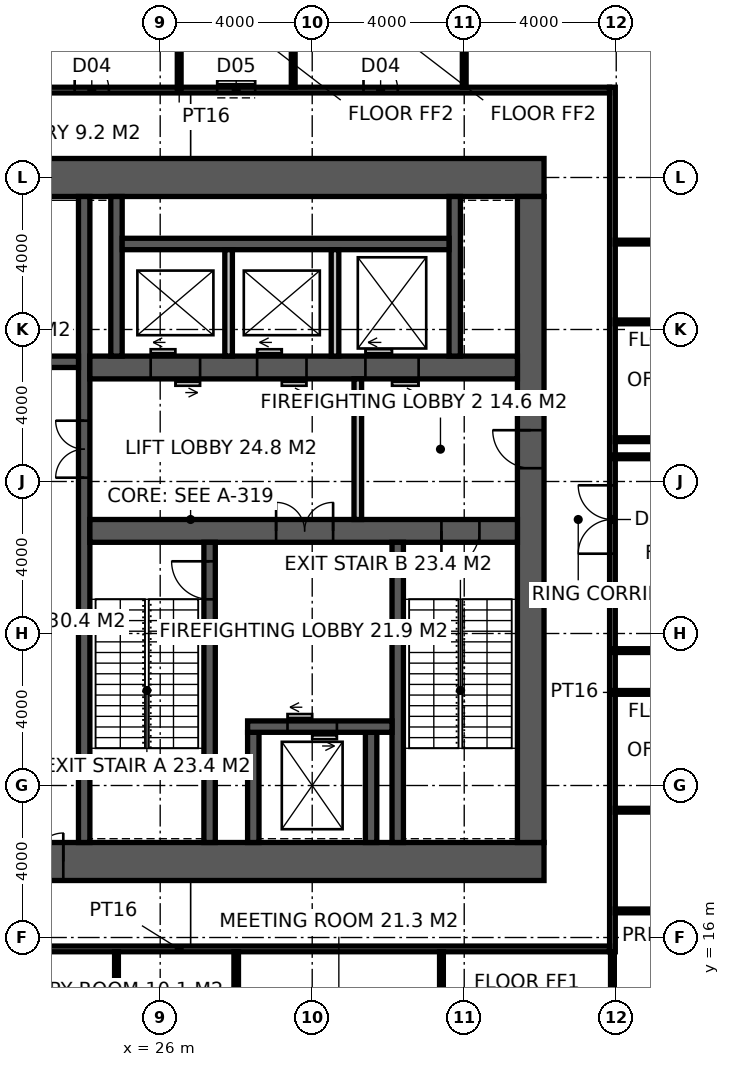
"""IFC4 building model, lengths in metres.
Left out: names, types, materials, properties, quantities, classifications, styles, units other than length and angle.
Written with IfcOpenShell. Run it as: python <this file> out.ifc"""

import sys

from ifc_helpers import new_model, si_unit, direction, frame, frame_2d, origin, place, context, subcontext, project, spatial, rectangle, extrude, element, fill, save


model = new_model("IFC4")
c1 = context("Model", 3, precision=1e-05, world=origin(), true_north=direction((0.0, 1.0)))
c2 = subcontext(c1, "Body", "Model", "MODEL_VIEW")
j1 = project(units=[si_unit("LENGTHUNIT", "METRE"), si_unit("PLANEANGLEUNIT", "RADIAN")], contexts=[c1])
p1 = place(None, origin())
s1 = spatial("IfcSite", under=j1, at=p1, CompositionType="ELEMENT")
p2 = place(p1, origin())
s2 = spatial("IfcBuilding", under=s1, at=p2, CompositionType="ELEMENT")
p3 = place(p2, frame((0.0, 0.0, 76.4)))
s3 = spatial("IfcBuildingStorey", under=s2, at=p3, CompositionType="ELEMENT", Elevation=76.4)
p4 = place(p3, frame((18.5, 18.0, -0.15), z_axis=(0.0, 0.0, 1.0), x_axis=(1.0, 0.0, 0.0)))
e1 = element("IfcWall", 1, at=p4, inside=s3, PredefinedType="SHEAR", context=c2, shape_type="SweptSolid", body=[
    extrude(rectangle(XDim=17.6, YDim=1.0, at=frame_2d((8.8, 0.0))), origin(), (0.0, 0.0, 1.0), 5.0),
])
p5 = place(p4, frame((3.45, 0.0, 0.15)))
e2 = element("IfcOpeningElement", 2, at=p5, cuts=e1, PredefinedType="OPENING", context=c2, shape_type="SweptSolid", body=[
    extrude(rectangle(XDim=1.5, YDim=2.4, at=frame_2d((0.75, 1.2))), frame((0.0, 0.51, 0.0), z_axis=(0.0, -1.0, 0.0), x_axis=(1.0, 0.0, 0.0)), (0.0, 0.0, 1.0), 1.02),
])
p6 = place(p3, frame((18.5, 36.0, -0.15), z_axis=(0.0, 0.0, 1.0), x_axis=(1.0, 0.0, 0.0)))
e3 = element("IfcWall", 3, at=p6, inside=s3, PredefinedType="SHEAR", context=c2, shape_type="SweptSolid", body=[
    extrude(rectangle(XDim=17.6, YDim=1.0, at=frame_2d((8.8, 0.0))), origin(), (0.0, 0.0, 1.0), 5.0),
])
p7 = place(p3, frame((35.75, 18.5, -0.15), z_axis=(0.0, 0.0, 1.0), x_axis=(0.0, 1.0, 0.0)))
e4 = element("IfcWall", 4, at=p7, inside=s3, PredefinedType="SHEAR", context=c2, shape_type="SweptSolid", body=[
    extrude(rectangle(XDim=17.0, YDim=0.7, at=frame_2d((8.5, 0.0))), origin(), (0.0, 0.0, 1.0), 5.0),
])
p8 = place(p7, frame((9.85, 0.0, 0.15)))
e5 = element("IfcOpeningElement", 5, at=p8, cuts=e4, PredefinedType="OPENING", context=c2, shape_type="SweptSolid", body=[
    extrude(rectangle(XDim=1.0, YDim=2.2, at=frame_2d((0.5, 1.1))), frame((0.0, 0.36, 0.0), z_axis=(0.0, -1.0, 0.0), x_axis=(1.0, 0.0, 0.0)), (0.0, 0.0, 1.0), 0.72),
])
p9 = place(p3, frame((24.0, 18.5, -0.15), z_axis=(0.0, 0.0, 1.0), x_axis=(0.0, 1.0, 0.0)))
e6 = element("IfcWall", 6, at=p9, inside=s3, PredefinedType="SHEAR", context=c2, shape_type="SweptSolid", body=[
    extrude(rectangle(XDim=17.0, YDim=0.3, at=frame_2d((8.5, 0.0))), origin(), (0.0, 0.0, 1.0), 5.0),
])
p10 = place(p9, frame((9.6, 0.0, 0.15)))
e7 = element("IfcOpeningElement", 7, at=p10, cuts=e6, PredefinedType="OPENING", context=c2, shape_type="SweptSolid", body=[
    extrude(rectangle(XDim=1.5, YDim=2.4, at=frame_2d((0.75, 1.2))), frame((0.0, 0.16, 0.0), z_axis=(0.0, -1.0, 0.0), x_axis=(1.0, 0.0, 0.0)), (0.0, 0.0, 1.0), 0.32),
])
p11 = place(p3, frame((24.15, 26.7, -0.15), z_axis=(0.0, 0.0, 1.0), x_axis=(1.0, 0.0, 0.0)))
e8 = element("IfcWall", 8, at=p11, inside=s3, PredefinedType="SHEAR", context=c2, shape_type="SweptSolid", body=[
    extrude(rectangle(XDim=11.25, YDim=0.6, at=frame_2d((5.625, 0.0))), origin(), (0.0, 0.0, 1.0), 5.0),
])
p12 = place(p11, frame((9.25, 0.0, 0.15)))
e9 = element("IfcOpeningElement", 9, at=p12, cuts=e8, PredefinedType="OPENING", context=c2, shape_type="SweptSolid", body=[
    extrude(rectangle(XDim=1.0, YDim=2.2, at=frame_2d((0.5, 1.1))), frame((0.0, 0.31, 0.0), z_axis=(0.0, -1.0, 0.0), x_axis=(1.0, 0.0, 0.0)), (0.0, 0.0, 1.0), 0.62),
])
p13 = place(p11, frame((4.9, 0.0, 0.15)))
e10 = element("IfcOpeningElement", 10, at=p13, cuts=e8, PredefinedType="OPENING", context=c2, shape_type="SweptSolid", body=[
    extrude(rectangle(XDim=1.5, YDim=2.4, at=frame_2d((0.75, 1.2))), frame((0.0, 0.31, 0.0), z_axis=(0.0, -1.0, 0.0), x_axis=(1.0, 0.0, 0.0)), (0.0, 0.0, 1.0), 0.62),
])
p14 = place(p3, frame((27.3, 18.5, -0.15), z_axis=(0.0, 0.0, 1.0), x_axis=(0.0, 1.0, 0.0)))
e11 = element("IfcWall", 11, at=p14, inside=s3, PredefinedType="SHEAR", context=c2, shape_type="SweptSolid", body=[
    extrude(rectangle(XDim=7.9, YDim=0.3, at=frame_2d((3.95, 0.0))), origin(), (0.0, 0.0, 1.0), 5.0),
])
p15 = place(p14, frame((6.4, 0.0, 0.15)))
e12 = element("IfcOpeningElement", 12, at=p15, cuts=e11, PredefinedType="OPENING", context=c2, shape_type="SweptSolid", body=[
    extrude(rectangle(XDim=1.0, YDim=2.2, at=frame_2d((0.5, 1.1))), frame((0.0, 0.16, 0.0), z_axis=(0.0, -1.0, 0.0), x_axis=(1.0, 0.0, 0.0)), (0.0, 0.0, 1.0), 0.32),
])
p16 = place(p3, frame((32.25, 18.5, -0.15), z_axis=(0.0, 0.0, 1.0), x_axis=(0.0, 1.0, 0.0)))
e13 = element("IfcWall", 13, at=p16, inside=s3, PredefinedType="SHEAR", context=c2, shape_type="SweptSolid", body=[
    extrude(rectangle(XDim=7.9, YDim=0.3, at=frame_2d((3.95, 0.0))), origin(), (0.0, 0.0, 1.0), 5.0),
])
for number, where, z_axis, x_axis in (
    (14, (28.45, 18.5, -0.15), (0.0, 0.0, 1.0), (0.0, 1.0, 0.0)),
    (15, (31.55, 18.5, -0.15), (0.0, 0.0, 1.0), (0.0, 1.0, 0.0)),
):
    element("IfcWall", number, at=place(p3, frame(where, z_axis=z_axis, x_axis=x_axis)), inside=s3, PredefinedType="SHEAR", context=c2, shape_type="SweptSolid", body=[
        extrude(rectangle(XDim=2.9, YDim=0.3, at=frame_2d((1.45, 0.0))), origin(), (0.0, 0.0, 1.0), 5.0),
    ])
p17 = place(p3, frame((28.3, 21.55, -0.15), z_axis=(0.0, 0.0, 1.0), x_axis=(1.0, 0.0, 0.0)))
e16 = element("IfcWall", 16, at=p17, inside=s3, PredefinedType="SHEAR", context=c2, shape_type="SweptSolid", body=[
    extrude(rectangle(XDim=3.8, YDim=0.3, at=frame_2d((1.9, 0.0))), origin(), (0.0, 0.0, 1.0), 5.0),
])
p18 = place(p17, frame((1.05, 0.0, 0.15)))
e17 = element("IfcOpeningElement", 17, at=p18, cuts=e16, PredefinedType="OPENING", context=c2, shape_type="SweptSolid", body=[
    extrude(rectangle(XDim=1.3, YDim=2.4, at=frame_2d((0.65, 1.2))), frame((0.0, 0.16, 0.0), z_axis=(0.0, -1.0, 0.0), x_axis=(1.0, 0.0, 0.0)), (0.0, 0.0, 1.0), 0.32),
])
p19 = place(p3, frame((24.15, 31.0, -0.15), z_axis=(0.0, 0.0, 1.0), x_axis=(1.0, 0.0, 0.0)))
e18 = element("IfcWall", 18, at=p19, inside=s3, PredefinedType="SHEAR", context=c2, shape_type="SweptSolid", body=[
    extrude(rectangle(XDim=11.25, YDim=0.6, at=frame_2d((5.625, 0.0))), origin(), (0.0, 0.0, 1.0), 5.0),
])
p20 = place(p19, frame((1.6, 0.0, 0.15)))
e19 = element("IfcOpeningElement", 19, at=p20, cuts=e18, PredefinedType="OPENING", context=c2, shape_type="SweptSolid", body=[
    extrude(rectangle(XDim=1.3, YDim=2.4, at=frame_2d((0.65, 1.2))), frame((0.0, 0.31, 0.0), z_axis=(0.0, -1.0, 0.0), x_axis=(1.0, 0.0, 0.0)), (0.0, 0.0, 1.0), 0.62),
])
p21 = place(p19, frame((4.4, 0.0, 0.15)))
e20 = element("IfcOpeningElement", 20, at=p21, cuts=e18, PredefinedType="OPENING", context=c2, shape_type="SweptSolid", body=[
    extrude(rectangle(XDim=1.3, YDim=2.4, at=frame_2d((0.65, 1.2))), frame((0.0, 0.31, 0.0), z_axis=(0.0, -1.0, 0.0), x_axis=(1.0, 0.0, 0.0)), (0.0, 0.0, 1.0), 0.62),
])
p22 = place(p19, frame((7.25, 0.0, 0.15)))
e21 = element("IfcOpeningElement", 21, at=p22, cuts=e18, PredefinedType="OPENING", context=c2, shape_type="SweptSolid", body=[
    extrude(rectangle(XDim=1.4, YDim=2.4, at=frame_2d((0.7, 1.2))), frame((0.0, 0.31, 0.0), z_axis=(0.0, -1.0, 0.0), x_axis=(1.0, 0.0, 0.0)), (0.0, 0.0, 1.0), 0.62),
])
p23 = place(p3, frame((18.5, 31.15, -0.15), z_axis=(0.0, 0.0, 1.0), x_axis=(1.0, 0.0, 0.0)))
e22 = element("IfcWall", 22, at=p23, inside=s3, PredefinedType="SHEAR", context=c2, shape_type="SweptSolid", body=[
    extrude(rectangle(XDim=5.35, YDim=0.3, at=frame_2d((2.675, 0.0))), origin(), (0.0, 0.0, 1.0), 5.0),
])
p24 = place(p23, frame((3.4, 0.0, 0.15)))
e23 = element("IfcOpeningElement", 23, at=p24, cuts=e22, PredefinedType="OPENING", context=c2, shape_type="SweptSolid", body=[
    extrude(rectangle(XDim=1.0, YDim=2.2, at=frame_2d((0.5, 1.1))), frame((0.0, 0.16, 0.0), z_axis=(0.0, -1.0, 0.0), x_axis=(1.0, 0.0, 0.0)), (0.0, 0.0, 1.0), 0.32),
])
for number, where, z_axis, x_axis in (
    (24, (24.85, 31.3, -0.15), (0.0, 0.0, 1.0), (0.0, 1.0, 0.0)),
    (25, (33.75, 31.3, -0.15), (0.0, 0.0, 1.0), (0.0, 1.0, 0.0)),
):
    element("IfcWall", number, at=place(p3, frame(where, z_axis=z_axis, x_axis=x_axis)), inside=s3, PredefinedType="SHEAR", context=c2, shape_type="SweptSolid", body=[
        extrude(rectangle(XDim=4.2, YDim=0.3, at=frame_2d((2.1, 0.0))), origin(), (0.0, 0.0, 1.0), 5.0),
    ])
p25 = place(p3, frame((25.0, 34.25, -0.15), z_axis=(0.0, 0.0, 1.0), x_axis=(1.0, 0.0, 0.0)))
e26 = element("IfcWall", 26, at=p25, inside=s3, PredefinedType="SHEAR", context=c2, shape_type="SweptSolid", body=[
    extrude(rectangle(XDim=8.6, YDim=0.3, at=frame_2d((4.3, 0.0))), origin(), (0.0, 0.0, 1.0), 5.0),
])
for number, where, z_axis, x_axis in (
    (27, (27.8, 31.3, -0.15), (0.0, 0.0, 1.0), (0.0, 1.0, 0.0)),
    (28, (30.6, 31.3, -0.15), (0.0, 0.0, 1.0), (0.0, 1.0, 0.0)),
):
    element("IfcWall", number, at=place(p3, frame(where, z_axis=z_axis, x_axis=x_axis)), inside=s3, PredefinedType="SOLIDWALL", context=c2, shape_type="SweptSolid", body=[
        extrude(rectangle(XDim=2.8, YDim=0.2, at=frame_2d((1.4, 0.0))), origin(), (0.0, 0.0, 1.0), 5.0),
    ])
p26 = place(p3, frame((31.2, 27.0, 0.0), z_axis=(0.0, 0.0, 1.0), x_axis=(0.0, 1.0, 0.0)))
e29 = element("IfcWall", 29, at=p26, inside=s3, PredefinedType="SOLIDWALL", context=c2, shape_type="SweptSolid", body=[
    extrude(rectangle(XDim=3.7, YDim=0.2, at=frame_2d((1.85, 0.0))), origin(), (0.0, 0.0, 1.0), 4.85),
])
p27 = place(p3, frame((37.9, 15.625, 0.0), z_axis=(0.0, 0.0, 1.0), x_axis=(0.0, 1.0, 0.0)))
e30 = element("IfcWall", 30, at=p27, inside=s3, PredefinedType="PARTITIONING", context=c2, shape_type="SweptSolid", body=[
    extrude(rectangle(XDim=22.75, YDim=0.15, at=frame_2d((11.375, 0.0))), origin(), (0.0, 0.0, 1.0), 3.95),
])
p28 = place(p27, frame((10.475, 0.0, 0.0)))
e31 = element("IfcOpeningElement", 31, at=p28, cuts=e30, PredefinedType="OPENING", context=c2, shape_type="SweptSolid", body=[
    extrude(rectangle(XDim=1.8, YDim=2.4, at=frame_2d((0.9, 1.2))), frame((0.0, 0.085, 0.0), z_axis=(0.0, -1.0, 0.0), x_axis=(1.0, 0.0, 0.0)), (0.0, 0.0, 1.0), 0.17),
])
p29 = place(p3, frame((15.175, 15.7, 0.0), z_axis=(0.0, 0.0, 1.0), x_axis=(1.0, 0.0, 0.0)))
e32 = element("IfcWall", 32, at=p29, inside=s3, PredefinedType="PARTITIONING", context=c2, shape_type="SweptSolid", body=[
    extrude(rectangle(XDim=22.65, YDim=0.15, at=frame_2d((11.325, 0.0))), origin(), (0.0, 0.0, 1.0), 4.85),
])
p30 = place(p3, frame((15.175, 38.3, 0.0), z_axis=(0.0, 0.0, 1.0), x_axis=(1.0, 0.0, 0.0)))
e33 = element("IfcWall", 33, at=p30, inside=s3, PredefinedType="PARTITIONING", context=c2, shape_type="SweptSolid", body=[
    extrude(rectangle(XDim=22.65, YDim=0.15, at=frame_2d((11.325, 0.0))), origin(), (0.0, 0.0, 1.0), 4.85),
])
p31 = place(p30, frame((8.575, 0.0, 0.0)))
e34 = element("IfcOpeningElement", 34, at=p31, cuts=e33, PredefinedType="OPENING", context=c2, shape_type="SweptSolid", body=[
    extrude(rectangle(XDim=0.9, YDim=2.1, at=frame_2d((0.45, 1.05))), frame((0.0, 0.085, 0.0), z_axis=(0.0, -1.0, 0.0), x_axis=(1.0, 0.0, 0.0)), (0.0, 0.0, 1.0), 0.17),
])
p32 = place(p30, frame((12.325, 0.0, 0.0)))
e35 = element("IfcOpeningElement", 35, at=p32, cuts=e33, PredefinedType="OPENING", context=c2, shape_type="SweptSolid", body=[
    extrude(rectangle(XDim=1.0, YDim=2.1, at=frame_2d((0.5, 1.05))), frame((0.0, 0.085, 0.0), z_axis=(0.0, -1.0, 0.0), x_axis=(1.0, 0.0, 0.0)), (0.0, 0.0, 1.0), 0.17),
])
p33 = place(p30, frame((16.175, 0.0, 0.0)))
e36 = element("IfcOpeningElement", 36, at=p33, cuts=e33, PredefinedType="OPENING", context=c2, shape_type="SweptSolid", body=[
    extrude(rectangle(XDim=0.9, YDim=2.1, at=frame_2d((0.45, 1.05))), frame((0.0, 0.085, 0.0), z_axis=(0.0, -1.0, 0.0), x_axis=(1.0, 0.0, 0.0)), (0.0, 0.0, 1.0), 0.17),
])
p34 = place(p3, frame((34.0, 38.375, 0.0), z_axis=(0.0, 0.0, 1.0), x_axis=(0.0, 1.0, 0.0)))
e37 = element("IfcWall", 37, at=p34, inside=s3, PredefinedType="PARTITIONING", context=c2, shape_type="SweptSolid", body=[
    extrude(rectangle(XDim=3.675, YDim=0.1, at=frame_2d((1.837, 0.0))), origin(), (0.0, 0.0, 1.0), 3.95),
])
for number, where, z_axis, x_axis in (
    (38, (26.5, 38.375, 0.0), (0.0, 0.0, 1.0), (0.0, 1.0, 0.0)),
    (39, (29.5, 38.375, 0.0), (0.0, 0.0, 1.0), (0.0, 1.0, 0.0)),
):
    element("IfcWall", number, at=place(p3, frame(where, z_axis=z_axis, x_axis=x_axis)), inside=s3, PredefinedType="PARTITIONING", context=c2, shape_type="SweptSolid", body=[
        extrude(rectangle(XDim=3.575, YDim=0.1, at=frame_2d((1.788, 0.0))), origin(), (0.0, 0.0, 1.0), 4.85),
    ])
p35 = place(p3, frame((28.0, 0.3, 0.0), z_axis=(0.0, 0.0, 1.0), x_axis=(0.0, 1.0, 0.0)))
e40 = element("IfcWall", 40, at=p35, inside=s3, PredefinedType="PARTITIONING", context=c2, shape_type="SweptSolid", body=[
    extrude(rectangle(XDim=15.325, YDim=0.12, at=frame_2d((7.663, 0.0))), origin(), (0.0, 0.0, 1.0), 4.85),
])
p36 = place(p3, frame((37.975, 16.7, 0.0), z_axis=(0.0, 0.0, 1.0), x_axis=(1.0, 0.0, 0.0)))
e41 = element("IfcWall", 41, at=p36, inside=s3, PredefinedType="PARTITIONING", context=c2, shape_type="SweptSolid", body=[
    extrude(rectangle(XDim=4.775, YDim=0.1, at=frame_2d((2.387, 0.0))), origin(), (0.0, 0.0, 1.0), 4.85),
])
p37 = place(p3, frame((37.975, 19.35, 0.0), z_axis=(0.0, 0.0, 1.0), x_axis=(1.0, 0.0, 0.0)))
e42 = element("IfcWall", 42, at=p37, inside=s3, PredefinedType="PARTITIONING", context=c2, shape_type="SweptSolid", body=[
    extrude(rectangle(XDim=4.675, YDim=0.1, at=frame_2d((2.337, 0.0))), origin(), (0.0, 0.0, 1.0), 4.85),
])
for number, where, z_axis, x_axis in (
    (43, (37.975, 22.45, 0.0), (0.0, 0.0, 1.0), (1.0, 0.0, 0.0)),
    (44, (37.975, 29.1, 0.0), (0.0, 0.0, 1.0), (1.0, 0.0, 0.0)),
):
    element("IfcWall", number, at=place(p3, frame(where, z_axis=z_axis, x_axis=x_axis)), inside=s3, PredefinedType="PARTITIONING", context=c2, shape_type="SweptSolid", body=[
        extrude(rectangle(XDim=4.775, YDim=0.1, at=frame_2d((2.387, 0.0))), origin(), (0.0, 0.0, 1.0), 4.85),
    ])
p38 = place(p3, frame((37.975, 32.2, 0.0), z_axis=(0.0, 0.0, 1.0), x_axis=(1.0, 0.0, 0.0)))
e45 = element("IfcWall", 45, at=p38, inside=s3, PredefinedType="PARTITIONING", context=c2, shape_type="SweptSolid", body=[
    extrude(rectangle(XDim=4.675, YDim=0.1, at=frame_2d((2.337, 0.0))), origin(), (0.0, 0.0, 1.0), 3.95),
])
p39 = place(p3, frame((37.975, 34.3, 0.0), z_axis=(0.0, 0.0, 1.0), x_axis=(1.0, 0.0, 0.0)))
e46 = element("IfcWall", 46, at=p39, inside=s3, PredefinedType="PARTITIONING", context=c2, shape_type="SweptSolid", body=[
    extrude(rectangle(XDim=4.775, YDim=0.1, at=frame_2d((2.387, 0.0))), origin(), (0.0, 0.0, 1.0), 4.85),
])
for number, where, z_axis, x_axis in (
    (47, (24.85, 11.55, 0.0), (0.0, 0.0, 1.0), (0.0, 1.0, 0.0)),
    (48, (33.401, 11.55, 0.0), (0.0, 0.0, 1.0), (0.0, 1.0, 0.0)),
):
    element("IfcWall", number, at=place(p3, frame(where, z_axis=z_axis, x_axis=x_axis)), inside=s3, PredefinedType="PARTITIONING", context=c2, shape_type="SweptSolid", body=[
        extrude(rectangle(XDim=4.075, YDim=0.1, at=frame_2d((2.038, 0.0))), origin(), (0.0, 0.0, 1.0), 4.85),
    ])
p40 = place(p3, frame((37.9, 11.55, 0.0), z_axis=(0.0, 0.0, 1.0), x_axis=(0.0, 1.0, 0.0)))
e49 = element("IfcWall", 49, at=p40, inside=s3, PredefinedType="PARTITIONING", context=c2, shape_type="SweptSolid", body=[
    extrude(rectangle(XDim=4.075, YDim=0.1, at=frame_2d((2.038, 0.0))), origin(), (0.0, 0.0, 1.0), 3.95),
])
p41 = place(p3, frame((37.9, 23.55, 0.0), z_axis=(0.0, 0.0, 1.0), x_axis=(1.0, 0.0, 0.0)))
e50 = element("IfcWall", 50, at=p41, inside=s3, PredefinedType="PARTITIONING", context=c2, shape_type="SweptSolid", body=[
    extrude(rectangle(XDim=4.5, YDim=0.1, at=frame_2d((2.25, 0.0))), origin(), (0.0, 0.0, 1.0), 3.95),
])
p42 = place(p3, frame((42.4, 28.65, 0.0), z_axis=(0.0, 0.0, 1.0), x_axis=(-1.0, 0.0, 0.0)))
e51 = element("IfcWall", 51, at=p42, inside=s3, PredefinedType="PARTITIONING", context=c2, shape_type="SweptSolid", body=[
    extrude(rectangle(XDim=4.5, YDim=0.1, at=frame_2d((2.25, 0.0))), origin(), (0.0, 0.0, 1.0), 4.85),
])
p43 = place(p15, origin())
e52 = element("IfcDoor", 52, at=p43, inside=s3, OperationType="SINGLE_SWING_RIGHT", PredefinedType="DOOR", context=c2, shape_type="SweptSolid", body=[
    extrude(rectangle(XDim=1.0, YDim=2.2, at=frame_2d((0.5, 1.1))), frame((0.0, 0.025, 0.0), z_axis=(0.0, -1.0, 0.0), x_axis=(1.0, 0.0, 0.0)), (0.0, 0.0, 1.0), 0.05),
])
fill(e12, e52)
p44 = place(p12, frame((1.0, 0.0, 0.0), z_axis=(0.0, 0.0, 1.0), x_axis=(-1.0, 0.0, 0.0)))
e53 = element("IfcDoor", 53, at=p44, inside=s3, OperationType="SINGLE_SWING_RIGHT", PredefinedType="DOOR", context=c2, shape_type="SweptSolid", body=[
    extrude(rectangle(XDim=1.0, YDim=2.2, at=frame_2d((0.5, 1.1))), frame((0.0, 0.025, 0.0), z_axis=(0.0, -1.0, 0.0), x_axis=(1.0, 0.0, 0.0)), (0.0, 0.0, 1.0), 0.05),
])
fill(e9, e53)
p45 = place(p8, origin())
e54 = element("IfcDoor", 54, at=p45, inside=s3, OperationType="SINGLE_SWING_RIGHT", PredefinedType="DOOR", context=c2, shape_type="SweptSolid", body=[
    extrude(rectangle(XDim=1.0, YDim=2.2, at=frame_2d((0.5, 1.1))), frame((0.0, 0.025, 0.0), z_axis=(0.0, -1.0, 0.0), x_axis=(1.0, 0.0, 0.0)), (0.0, 0.0, 1.0), 0.05),
])
fill(e5, e54)
p46 = place(p13, origin())
e55 = element("IfcDoor", 55, at=p46, inside=s3, OperationType="DOUBLE_DOOR_DOUBLE_SWING", PredefinedType="DOOR", context=c2, shape_type="SweptSolid", body=[
    extrude(rectangle(XDim=1.5, YDim=2.4, at=frame_2d((0.75, 1.2))), frame((0.0, 0.025, 0.0), z_axis=(0.0, -1.0, 0.0), x_axis=(1.0, 0.0, 0.0)), (0.0, 0.0, 1.0), 0.05),
])
fill(e10, e55)
p47 = place(p10, origin())
e56 = element("IfcDoor", 56, at=p47, inside=s3, OperationType="DOUBLE_DOOR_DOUBLE_SWING", PredefinedType="DOOR", context=c2, shape_type="SweptSolid", body=[
    extrude(rectangle(XDim=1.5, YDim=2.4, at=frame_2d((0.75, 1.2))), frame((0.0, 0.025, 0.0), z_axis=(0.0, -1.0, 0.0), x_axis=(1.0, 0.0, 0.0)), (0.0, 0.0, 1.0), 0.05),
])
fill(e7, e56)
p48 = place(p5, origin())
e57 = element("IfcDoor", 57, at=p48, inside=s3, OperationType="DOUBLE_DOOR_DOUBLE_SWING", PredefinedType="DOOR", context=c2, shape_type="SweptSolid", body=[
    extrude(rectangle(XDim=1.5, YDim=2.4, at=frame_2d((0.75, 1.2))), frame((0.0, 0.025, 0.0), z_axis=(0.0, -1.0, 0.0), x_axis=(1.0, 0.0, 0.0)), (0.0, 0.0, 1.0), 0.05),
])
fill(e2, e57)
p49 = place(p31, origin())
e58 = element("IfcDoor", 58, at=p49, inside=s3, OperationType="SINGLE_SWING_LEFT", PredefinedType="DOOR", context=c2, shape_type="SweptSolid", body=[
    extrude(rectangle(XDim=0.9, YDim=2.1, at=frame_2d((0.45, 1.05))), frame((0.0, 0.025, 0.0), z_axis=(0.0, -1.0, 0.0), x_axis=(1.0, 0.0, 0.0)), (0.0, 0.0, 1.0), 0.05),
])
fill(e34, e58)
p50 = place(p32, origin())
e59 = element("IfcDoor", 59, at=p50, inside=s3, OperationType="SLIDING_TO_LEFT", PredefinedType="DOOR", context=c2, shape_type="SweptSolid", body=[
    extrude(rectangle(XDim=1.0, YDim=2.1, at=frame_2d((0.5, 1.05))), frame((0.0, 0.025, 0.0), z_axis=(0.0, -1.0, 0.0), x_axis=(1.0, 0.0, 0.0)), (0.0, 0.0, 1.0), 0.05),
])
fill(e35, e59)
p51 = place(p33, origin())
e60 = element("IfcDoor", 60, at=p51, inside=s3, OperationType="SINGLE_SWING_LEFT", PredefinedType="DOOR", context=c2, shape_type="SweptSolid", body=[
    extrude(rectangle(XDim=0.9, YDim=2.1, at=frame_2d((0.45, 1.05))), frame((0.0, 0.025, 0.0), z_axis=(0.0, -1.0, 0.0), x_axis=(1.0, 0.0, 0.0)), (0.0, 0.0, 1.0), 0.05),
])
fill(e36, e60)
p52 = place(p28, origin())
e61 = element("IfcDoor", 61, at=p52, inside=s3, OperationType="DOUBLE_DOOR_DOUBLE_SWING", PredefinedType="DOOR", context=c2, shape_type="SweptSolid", body=[
    extrude(rectangle(XDim=1.8, YDim=2.4, at=frame_2d((0.9, 1.2))), frame((0.0, 0.025, 0.0), z_axis=(0.0, -1.0, 0.0), x_axis=(1.0, 0.0, 0.0)), (0.0, 0.0, 1.0), 0.05),
])
fill(e31, e61)
p53 = place(p18, origin())
e62 = element("IfcDoor", 62, at=p53, inside=s3, OperationType="DOUBLE_DOOR_SLIDING", PredefinedType="DOOR", context=c2, shape_type="SweptSolid", body=[
    extrude(rectangle(XDim=1.3, YDim=2.4, at=frame_2d((0.65, 1.2))), frame((0.0, 0.025, 0.0), z_axis=(0.0, -1.0, 0.0), x_axis=(1.0, 0.0, 0.0)), (0.0, 0.0, 1.0), 0.05),
])
fill(e17, e62)
p54 = place(p20, origin())
e63 = element("IfcDoor", 63, at=p54, inside=s3, OperationType="DOUBLE_DOOR_SLIDING", PredefinedType="DOOR", context=c2, shape_type="SweptSolid", body=[
    extrude(rectangle(XDim=1.3, YDim=2.4, at=frame_2d((0.65, 1.2))), frame((0.0, 0.025, 0.0), z_axis=(0.0, -1.0, 0.0), x_axis=(1.0, 0.0, 0.0)), (0.0, 0.0, 1.0), 0.05),
])
fill(e19, e63)
p55 = place(p21, origin())
e64 = element("IfcDoor", 64, at=p55, inside=s3, OperationType="DOUBLE_DOOR_SLIDING", PredefinedType="DOOR", context=c2, shape_type="SweptSolid", body=[
    extrude(rectangle(XDim=1.3, YDim=2.4, at=frame_2d((0.65, 1.2))), frame((0.0, 0.025, 0.0), z_axis=(0.0, -1.0, 0.0), x_axis=(1.0, 0.0, 0.0)), (0.0, 0.0, 1.0), 0.05),
])
fill(e20, e64)
p56 = place(p22, origin())
e65 = element("IfcDoor", 65, at=p56, inside=s3, OperationType="DOUBLE_DOOR_SLIDING", PredefinedType="DOOR", context=c2, shape_type="SweptSolid", body=[
    extrude(rectangle(XDim=1.4, YDim=2.4, at=frame_2d((0.7, 1.2))), frame((0.0, 0.025, 0.0), z_axis=(0.0, -1.0, 0.0), x_axis=(1.0, 0.0, 0.0)), (0.0, 0.0, 1.0), 0.05),
])
fill(e21, e65)
save(model, sys.argv[1])
